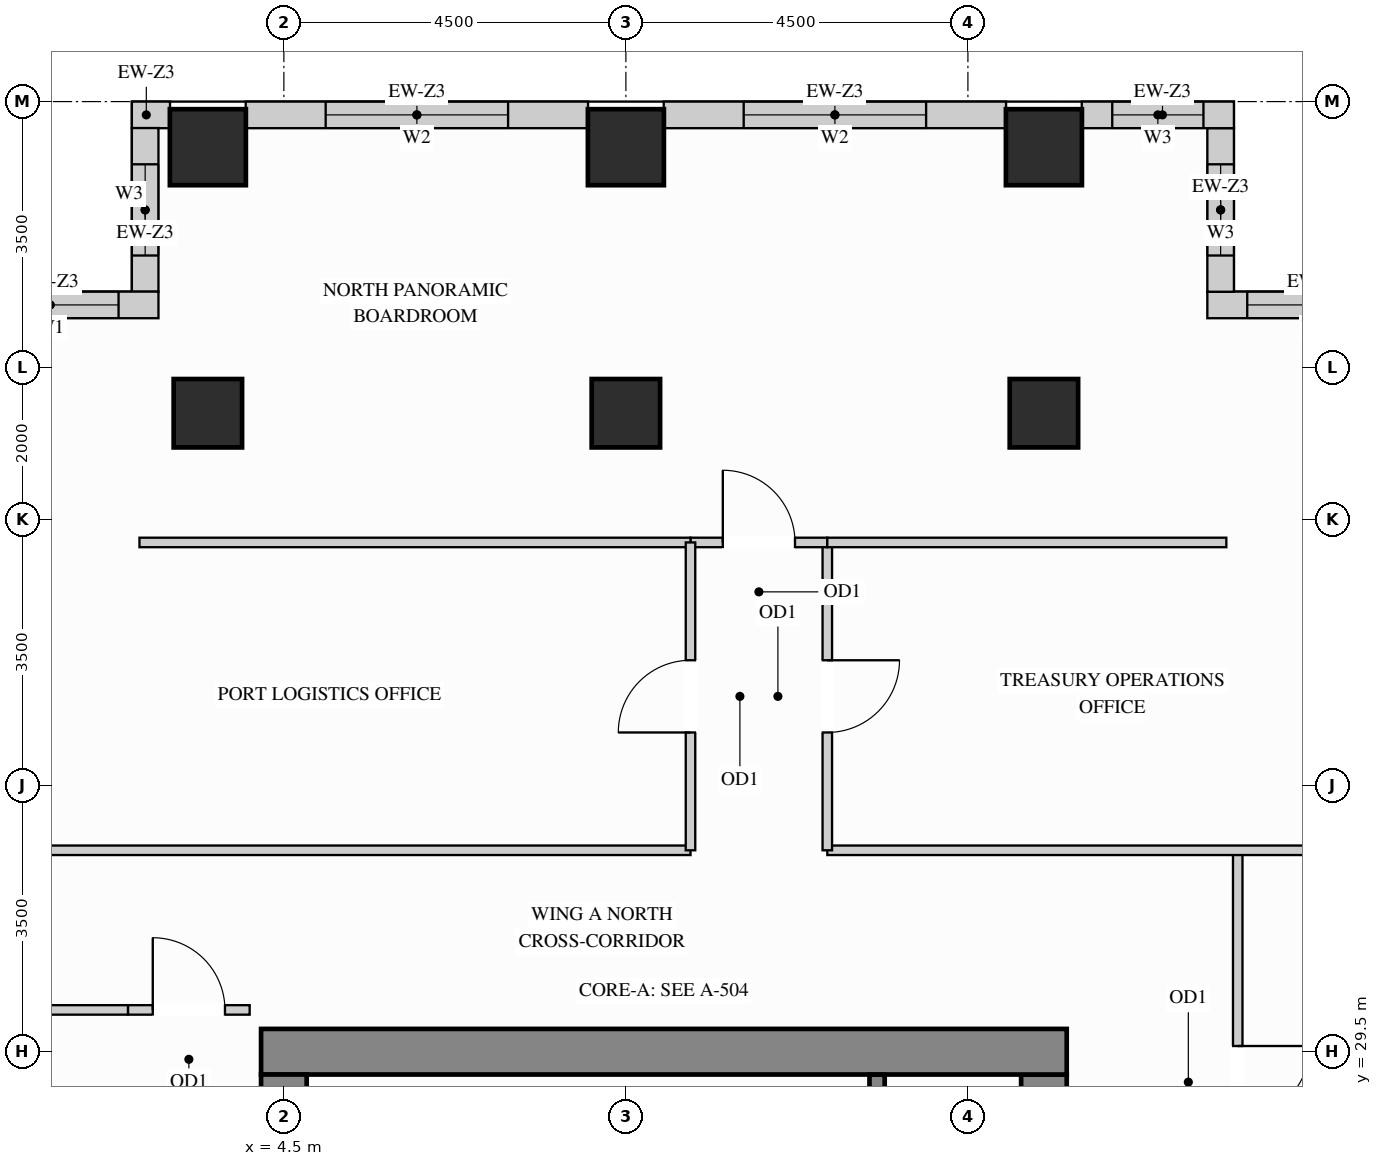
"""IFC4 building model, lengths in metres.
Left out: names, types, materials, properties, quantities, classifications, styles, units other than length and angle.
Written with IfcOpenShell. Run it as: python <this file> out.ifc"""

import sys

from ifc_helpers import new_model, si_unit, direction, frame, frame_2d, origin, origin_2d, place, context, subcontext, project, spatial, rectangle, extrude, source, transform, mapped, element, fill, save


model = new_model("IFC4")
c1 = context("Model", 3, precision=1e-05, world=origin(), true_north=direction((0.0, 1.0)))
c2 = subcontext(c1, "Body", "Model", "MODEL_VIEW")
j1 = project(units=[si_unit("LENGTHUNIT", "METRE"), si_unit("PLANEANGLEUNIT", "RADIAN")], contexts=[c1])
p1 = place(None, origin())
s1 = spatial("IfcSite", under=j1, at=p1, CompositionType="ELEMENT")
p2 = place(p1, origin())
s2 = spatial("IfcBuilding", under=s1, at=p2, CompositionType="ELEMENT")
p3 = place(p2, frame((0.0, 0.0, 164.7)))
s3 = spatial("IfcBuildingStorey", under=s2, at=p3, CompositionType="ELEMENT", Elevation=164.7)
m1 = source(origin(), c2, "Body", "SweptSolid", [
    extrude(rectangle(XDim=0.9, YDim=0.9, at=origin_2d()), origin(), (0.0, 0.0, 1.0), 3.4),
])
for number, where, z_axis, x_axis in (
    (1, (14.5, 37.9, 0.0), (0.0, 0.0, 1.0), (1.0, 0.0, 0.0)),
    (2, (3.5, 37.9, 0.0), (0.0, 0.0, 1.0), (1.0, 0.0, 0.0)),
    (3, (9.0, 37.9, 0.0), (0.0, 0.0, 1.0), (1.0, 0.0, 0.0)),
):
    element("IfcColumn", number, at=place(p3, frame(where, z_axis=z_axis, x_axis=x_axis)), inside=s3, PredefinedType="COLUMN", context=c2, shape_type="MappedRepresentation", body=[
        mapped(m1, transform((0.0, 0.0, 0.0), x_axis=(1.0, 0.0, 0.0), y_axis=(0.0, 1.0, 0.0), z_axis=(0.0, 0.0, 1.0))),
    ])
m2 = source(origin(), c2, "Body", "SweptSolid", [
    extrude(rectangle(XDim=1.0, YDim=1.0, at=origin_2d()), origin(), (0.0, 0.0, 1.0), 3.4),
])
for number, where, z_axis, x_axis in (
    (4, (14.5, 41.4, 0.0), (0.0, 0.0, 1.0), (1.0, 0.0, 0.0)),
    (5, (3.5, 41.4, 0.0), (0.0, 0.0, 1.0), (1.0, 0.0, 0.0)),
    (6, (9.0, 41.4, 0.0), (0.0, 0.0, 1.0), (1.0, 0.0, 0.0)),
):
    element("IfcColumn", number, at=place(p3, frame(where, z_axis=z_axis, x_axis=x_axis)), inside=s3, PredefinedType="COLUMN", context=c2, shape_type="MappedRepresentation", body=[
        mapped(m2, transform((0.0, 0.0, 0.0), x_axis=(1.0, 0.0, 0.0), y_axis=(0.0, 1.0, 0.0), z_axis=(0.0, 0.0, 1.0))),
    ])
m3 = source(origin(), c2, "Body", "SweptSolid", [
    extrude(rectangle(XDim=8.32, YDim=0.6, at=frame_2d((4.16, 0.0))), origin(), (0.0, 0.0, 1.0), 3.4),
])
p4 = place(p3, frame((14.5, 20.88, 0.0), z_axis=(0.0, 0.0, 1.0), x_axis=(0.0, 1.0, 0.0)))
e7 = element("IfcWall", 7, at=p4, inside=s3, PredefinedType="SHEAR", context=c2, shape_type="MappedRepresentation", body=[
    mapped(m3, transform((0.0, 0.0, 0.0), x_axis=(1.0, 0.0, 0.0), y_axis=(0.0, 1.0, 0.0), z_axis=(0.0, 0.0, 1.0))),
])
m4 = source(origin(), c2, "Body", "SweptSolid", [
    extrude(rectangle(XDim=10.6, YDim=0.6, at=frame_2d((5.3, 0.0))), origin(), (0.0, 0.0, 1.0), 3.4),
])
p5 = place(p3, frame((4.2, 29.5, 0.0), z_axis=(0.0, 0.0, 1.0), x_axis=(1.0, 0.0, 0.0)))
e8 = element("IfcWall", 8, at=p5, inside=s3, PredefinedType="SHEAR", context=c2, shape_type="MappedRepresentation", body=[
    mapped(m4, transform((0.0, 0.0, 0.0), x_axis=(1.0, 0.0, 0.0), y_axis=(0.0, 1.0, 0.0), z_axis=(0.0, 0.0, 1.0))),
])
m5 = source(origin(), c2, "Body", "SweptSolid", [
    extrude(rectangle(XDim=20.4, YDim=0.6, at=frame_2d((10.2, 0.0))), origin(), (0.0, 0.0, 1.0), 3.4),
])
p6 = place(p3, frame((4.5, 8.8, 0.0), z_axis=(0.0, 0.0, 1.0), x_axis=(0.0, 1.0, 0.0)))
e9 = element("IfcWall", 9, at=p6, inside=s3, PredefinedType="SHEAR", context=c2, shape_type="MappedRepresentation", body=[
    mapped(m5, transform((0.0, 0.0, 0.0), x_axis=(1.0, 0.0, 0.0), y_axis=(0.0, 1.0, 0.0), z_axis=(0.0, 0.0, 1.0))),
])
p7 = place(p3, frame((19.5, 39.325, 0.0), z_axis=(0.0, 0.0, 1.0), x_axis=(-1.0, 0.0, 0.0)))
e10 = element("IfcWall", 10, at=p7, inside=s3, PredefinedType="SOLIDWALL", context=c2, shape_type="SweptSolid", body=[
    extrude(rectangle(XDim=2.85, YDim=0.35, at=frame_2d((1.425, 0.0))), origin(), (0.0, 0.0, 1.0), 3.385),
])
p8 = place(p7, frame((0.525, 0.0, 0.78)))
e11 = element("IfcOpeningElement", 11, at=p8, cuts=e10, PredefinedType="OPENING", context=c2, shape_type="SweptSolid", body=[
    extrude(rectangle(XDim=1.8, YDim=2.1, at=frame_2d((0.9, 1.05))), frame((0.0, 0.185, 0.0), z_axis=(0.0, -1.0, 0.0), x_axis=(1.0, 0.0, 0.0)), (0.0, 0.0, 1.0), 0.37),
])
p9 = place(p3, frame((16.825, 39.498, 0.0), z_axis=(0.0, 0.0, 1.0), x_axis=(0.0, 1.0, 0.0)))
e12 = element("IfcWall", 12, at=p9, inside=s3, PredefinedType="SOLIDWALL", context=c2, shape_type="SweptSolid", body=[
    extrude(rectangle(XDim=2.154, YDim=0.35, at=frame_2d((1.077, 0.0))), origin(), (0.0, 0.0, 1.0), 3.385),
])
p10 = place(p9, frame((0.477, 0.0, 0.78)))
e13 = element("IfcOpeningElement", 13, at=p10, cuts=e12, PredefinedType="OPENING", context=c2, shape_type="SweptSolid", body=[
    extrude(rectangle(XDim=1.2, YDim=2.1, at=frame_2d((0.6, 1.05))), frame((0.0, 0.185, 0.0), z_axis=(0.0, -1.0, 0.0), x_axis=(1.0, 0.0, 0.0)), (0.0, 0.0, 1.0), 0.37),
])
p11 = place(p3, frame((17.0, 41.825, 0.0), z_axis=(0.0, 0.0, 1.0), x_axis=(-1.0, 0.0, 0.0)))
e14 = element("IfcWall", 14, at=p11, inside=s3, PredefinedType="SOLIDWALL", context=c2, shape_type="SweptSolid", body=[
    extrude(rectangle(XDim=2.002, YDim=0.35, at=frame_2d((1.001, 0.0))), origin(), (0.0, 0.0, 1.0), 3.385),
])
p12 = place(p11, frame((0.401, 0.0, 0.78)))
e15 = element("IfcOpeningElement", 15, at=p12, cuts=e14, PredefinedType="OPENING", context=c2, shape_type="SweptSolid", body=[
    extrude(rectangle(XDim=1.2, YDim=2.1, at=frame_2d((0.6, 1.05))), frame((0.0, 0.185, 0.0), z_axis=(0.0, -1.0, 0.0), x_axis=(1.0, 0.0, 0.0)), (0.0, 0.0, 1.0), 0.37),
])
p13 = place(p3, frame((14.002, 41.825, 0.0), z_axis=(0.0, 0.0, 1.0), x_axis=(-1.0, 0.0, 0.0)))
e16 = element("IfcWall", 16, at=p13, inside=s3, PredefinedType="SOLIDWALL", context=c2, shape_type="SweptSolid", body=[
    extrude(rectangle(XDim=4.504, YDim=0.35, at=frame_2d((2.252, 0.0))), origin(), (0.0, 0.0, 1.0), 2.612),
])
p14 = place(p13, frame((1.052, 0.0, 0.78)))
e17 = element("IfcOpeningElement", 17, at=p14, cuts=e16, PredefinedType="OPENING", context=c2, shape_type="SweptSolid", body=[
    extrude(rectangle(XDim=2.4, YDim=1.652, at=frame_2d((1.2, 0.826))), frame((0.0, 0.185, 0.0), z_axis=(0.0, -1.0, 0.0), x_axis=(1.0, 0.0, 0.0)), (0.0, 0.0, 1.0), 0.37),
])
p15 = place(p3, frame((8.502, 41.825, 0.0), z_axis=(0.0, 0.0, 1.0), x_axis=(-1.0, 0.0, 0.0)))
e18 = element("IfcWall", 18, at=p15, inside=s3, PredefinedType="SOLIDWALL", context=c2, shape_type="SweptSolid", body=[
    extrude(rectangle(XDim=4.504, YDim=0.35, at=frame_2d((2.252, 0.0))), origin(), (0.0, 0.0, 1.0), 2.612),
])
p16 = place(p15, frame((1.052, 0.0, 0.78)))
e19 = element("IfcOpeningElement", 19, at=p16, cuts=e18, PredefinedType="OPENING", context=c2, shape_type="SweptSolid", body=[
    extrude(rectangle(XDim=2.4, YDim=1.652, at=frame_2d((1.2, 0.826))), frame((0.0, 0.185, 0.0), z_axis=(0.0, -1.0, 0.0), x_axis=(1.0, 0.0, 0.0)), (0.0, 0.0, 1.0), 0.37),
])
m6 = source(origin(), c2, "Body", "SweptSolid", [
    extrude(rectangle(XDim=0.502, YDim=0.35, at=frame_2d((0.251, 0.0))), origin(), (0.0, 0.0, 1.0), 3.385),
])
p17 = place(p3, frame((3.002, 41.825, 0.0), z_axis=(0.0, 0.0, 1.0), x_axis=(-1.0, 0.0, 0.0)))
e20 = element("IfcWall", 20, at=p17, inside=s3, PredefinedType="SOLIDWALL", context=c2, shape_type="MappedRepresentation", body=[
    mapped(m6, transform((0.0, 0.0, 0.0), x_axis=(1.0, 0.0, 0.0), y_axis=(0.0, 1.0, 0.0), z_axis=(0.0, 0.0, 1.0))),
])
p18 = place(p3, frame((2.675, 41.652, 0.0), z_axis=(0.0, 0.0, 1.0), x_axis=(0.0, -1.0, 0.0)))
e21 = element("IfcWall", 21, at=p18, inside=s3, PredefinedType="SOLIDWALL", context=c2, shape_type="SweptSolid", body=[
    extrude(rectangle(XDim=2.154, YDim=0.35, at=frame_2d((1.077, 0.0))), origin(), (0.0, 0.0, 1.0), 3.385),
])
p19 = place(p18, frame((0.477, 0.0, 0.78)))
e22 = element("IfcOpeningElement", 22, at=p19, cuts=e21, PredefinedType="OPENING", context=c2, shape_type="SweptSolid", body=[
    extrude(rectangle(XDim=1.2, YDim=2.1, at=frame_2d((0.6, 1.05))), frame((0.0, 0.185, 0.0), z_axis=(0.0, -1.0, 0.0), x_axis=(1.0, 0.0, 0.0)), (0.0, 0.0, 1.0), 0.37),
])
p20 = place(p3, frame((2.85, 39.325, 0.0), z_axis=(0.0, 0.0, 1.0), x_axis=(-1.0, 0.0, 0.0)))
e23 = element("IfcWall", 23, at=p20, inside=s3, PredefinedType="SOLIDWALL", context=c2, shape_type="SweptSolid", body=[
    extrude(rectangle(XDim=2.85, YDim=0.35, at=frame_2d((1.425, 0.0))), origin(), (0.0, 0.0, 1.0), 3.385),
])
p21 = place(p20, frame((0.525, 0.0, 0.78)))
e24 = element("IfcOpeningElement", 24, at=p21, cuts=e23, PredefinedType="OPENING", context=c2, shape_type="SweptSolid", body=[
    extrude(rectangle(XDim=1.8, YDim=2.1, at=frame_2d((0.9, 1.05))), frame((0.0, 0.185, 0.0), z_axis=(0.0, -1.0, 0.0), x_axis=(1.0, 0.0, 0.0)), (0.0, 0.0, 1.0), 0.37),
])
p22 = place(p3, frame((17.05, 26.05, 0.0), z_axis=(0.0, 0.0, 1.0), x_axis=(0.0, 1.0, 0.0)))
e25 = element("IfcWall", 25, at=p22, inside=s3, PredefinedType="PARTITIONING", context=c2, shape_type="SweptSolid", body=[
    extrude(rectangle(XDim=6.1, YDim=0.125, at=frame_2d((3.05, 0.0))), origin(), (0.0, 0.0, 1.0), 3.385),
])
p23 = place(p22, frame((2.575, 0.0, 0.0)))
e26 = element("IfcOpeningElement", 26, at=p23, cuts=e25, PredefinedType="OPENING", context=c2, shape_type="SweptSolid", body=[
    extrude(rectangle(XDim=0.95, YDim=2.15, at=frame_2d((0.475, 1.075))), frame((0.0, 0.073, 0.0), z_axis=(0.0, -1.0, 0.0), x_axis=(1.0, 0.0, 0.0)), (0.0, 0.0, 1.0), 0.145),
])
m7 = source(origin(), c2, "Body", "SweptSolid", [
    extrude(rectangle(XDim=7.498, YDim=0.125, at=frame_2d((3.749, 0.0))), origin(), (0.0, 0.0, 1.0), 3.385),
])
p24 = place(p3, frame((11.65, 32.15, 0.0), z_axis=(0.0, 0.0, 1.0), x_axis=(1.0, 0.0, 0.0)))
e27 = element("IfcWall", 27, at=p24, inside=s3, PredefinedType="PARTITIONING", context=c2, shape_type="MappedRepresentation", body=[
    mapped(m7, transform((0.0, 0.0, 0.0), x_axis=(1.0, 0.0, 0.0), y_axis=(0.0, 1.0, 0.0), z_axis=(0.0, 0.0, 1.0))),
])
m8 = source(origin(), c2, "Body", "SweptSolid", [
    extrude(rectangle(XDim=9.498, YDim=0.125, at=frame_2d((4.749, 0.0))), origin(), (0.0, 0.0, 1.0), 3.385),
])
p25 = place(p3, frame((0.352, 32.15, 0.0), z_axis=(0.0, 0.0, 1.0), x_axis=(1.0, 0.0, 0.0)))
e28 = element("IfcWall", 28, at=p25, inside=s3, PredefinedType="PARTITIONING", context=c2, shape_type="MappedRepresentation", body=[
    mapped(m8, transform((0.0, 0.0, 0.0), x_axis=(1.0, 0.0, 0.0), y_axis=(0.0, 1.0, 0.0), z_axis=(0.0, 0.0, 1.0))),
])
m9 = source(origin(), c2, "Body", "SweptSolid", [
    extrude(rectangle(XDim=1.33, YDim=0.125, at=frame_2d((0.665, 0.0))), origin(), (0.0, 0.0, 1.0), 3.385),
])
p26 = place(p3, frame((1.12, 30.05, 0.0), z_axis=(0.0, 0.0, 1.0), x_axis=(1.0, 0.0, 0.0)))
e29 = element("IfcWall", 29, at=p26, inside=s3, PredefinedType="PARTITIONING", context=c2, shape_type="MappedRepresentation", body=[
    mapped(m9, transform((0.0, 0.0, 0.0), x_axis=(1.0, 0.0, 0.0), y_axis=(0.0, 1.0, 0.0), z_axis=(0.0, 0.0, 1.0))),
])
p27 = place(p3, frame((2.45, 30.05, 0.0), z_axis=(0.0, 0.0, 1.0), x_axis=(1.0, 0.0, 0.0)))
e30 = element("IfcWall", 30, at=p27, inside=s3, PredefinedType="PARTITIONING", context=c2, shape_type="SweptSolid", body=[
    extrude(rectangle(XDim=1.6, YDim=0.125, at=frame_2d((0.8, 0.0))), origin(), (0.0, 0.0, 1.0), 3.385),
])
p28 = place(p27, frame((0.325, 0.0, 0.0)))
e31 = element("IfcOpeningElement", 31, at=p28, cuts=e30, PredefinedType="OPENING", context=c2, shape_type="SweptSolid", body=[
    extrude(rectangle(XDim=0.95, YDim=2.15, at=frame_2d((0.475, 1.075))), frame((0.0, 0.073, 0.0), z_axis=(0.0, -1.0, 0.0), x_axis=(1.0, 0.0, 0.0)), (0.0, 0.0, 1.0), 0.145),
])
p29 = place(p3, frame((11.65, 32.15, 0.0), z_axis=(0.0, 0.0, 1.0), x_axis=(0.0, 1.0, 0.0)))
e32 = element("IfcWall", 32, at=p29, inside=s3, PredefinedType="PARTITIONING", context=c2, shape_type="SweptSolid", body=[
    extrude(rectangle(XDim=4.05, YDim=0.125, at=frame_2d((2.025, 0.0))), origin(), (0.0, 0.0, 1.0), 3.385),
])
p30 = place(p29, frame((1.55, 0.0, 0.0)))
e33 = element("IfcOpeningElement", 33, at=p30, cuts=e32, PredefinedType="OPENING", context=c2, shape_type="SweptSolid", body=[
    extrude(rectangle(XDim=0.95, YDim=2.15, at=frame_2d((0.475, 1.075))), frame((0.0, 0.073, 0.0), z_axis=(0.0, -1.0, 0.0), x_axis=(1.0, 0.0, 0.0)), (0.0, 0.0, 1.0), 0.145),
])
p31 = place(p3, frame((9.85, 36.2, 0.0), z_axis=(0.0, 0.0, 1.0), x_axis=(1.0, 0.0, 0.0)))
e34 = element("IfcWall", 34, at=p31, inside=s3, PredefinedType="PARTITIONING", context=c2, shape_type="SweptSolid", body=[
    extrude(rectangle(XDim=1.8, YDim=0.125, at=frame_2d((0.9, 0.0))), origin(), (0.0, 0.0, 1.0), 2.848),
])
p32 = place(p31, frame((0.425, 0.0, 0.0)))
e35 = element("IfcOpeningElement", 35, at=p32, cuts=e34, PredefinedType="OPENING", context=c2, shape_type="SweptSolid", body=[
    extrude(rectangle(XDim=0.95, YDim=2.15, at=frame_2d((0.475, 1.075))), frame((0.0, 0.073, 0.0), z_axis=(0.0, -1.0, 0.0), x_axis=(1.0, 0.0, 0.0)), (0.0, 0.0, 1.0), 0.145),
])
m10 = source(origin(), c2, "Body", "SweptSolid", [
    extrude(rectangle(XDim=5.25, YDim=0.125, at=frame_2d((2.625, 0.0))), origin(), (0.0, 0.0, 1.0), 2.848),
])
p33 = place(p3, frame((11.65, 36.2, 0.0), z_axis=(0.0, 0.0, 1.0), x_axis=(1.0, 0.0, 0.0)))
e36 = element("IfcWall", 36, at=p33, inside=s3, PredefinedType="PARTITIONING", context=c2, shape_type="MappedRepresentation", body=[
    mapped(m10, transform((0.0, 0.0, 0.0), x_axis=(1.0, 0.0, 0.0), y_axis=(0.0, 1.0, 0.0), z_axis=(0.0, 0.0, 1.0))),
])
m11 = source(origin(), c2, "Body", "SweptSolid", [
    extrude(rectangle(XDim=7.25, YDim=0.125, at=frame_2d((3.625, 0.0))), origin(), (0.0, 0.0, 1.0), 2.848),
])
p34 = place(p3, frame((2.6, 36.2, 0.0), z_axis=(0.0, 0.0, 1.0), x_axis=(1.0, 0.0, 0.0)))
e37 = element("IfcWall", 37, at=p34, inside=s3, PredefinedType="PARTITIONING", context=c2, shape_type="MappedRepresentation", body=[
    mapped(m11, transform((0.0, 0.0, 0.0), x_axis=(1.0, 0.0, 0.0), y_axis=(0.0, 1.0, 0.0), z_axis=(0.0, 0.0, 1.0))),
])
p35 = place(p3, frame((9.85, 32.15, 0.0), z_axis=(0.0, 0.0, 1.0), x_axis=(0.0, 1.0, 0.0)))
e38 = element("IfcWall", 38, at=p35, inside=s3, PredefinedType="PARTITIONING", context=c2, shape_type="SweptSolid", body=[
    extrude(rectangle(XDim=4.05, YDim=0.125, at=frame_2d((2.025, 0.0))), origin(), (0.0, 0.0, 1.0), 3.385),
])
p36 = place(p35, frame((1.55, 0.0, 0.0)))
e39 = element("IfcOpeningElement", 39, at=p36, cuts=e38, PredefinedType="OPENING", context=c2, shape_type="SweptSolid", body=[
    extrude(rectangle(XDim=0.95, YDim=2.15, at=frame_2d((0.475, 1.075))), frame((0.0, 0.073, 0.0), z_axis=(0.0, -1.0, 0.0), x_axis=(1.0, 0.0, 0.0)), (0.0, 0.0, 1.0), 0.145),
])
m12 = source(origin(), c2, "Body", "SweptSolid", [
    extrude(rectangle(XDim=3.753, YDim=0.2, at=frame_2d((1.876, 0.0))), origin(), (0.0, 0.0, 1.0), 3.4),
])
p37 = place(p3, frame((12.305, 25.445, 0.0), z_axis=(0.0, 0.0, 1.0), x_axis=(0.0, 1.0, 0.0)))
e40 = element("IfcWall", 40, at=p37, inside=s3, PredefinedType="SHEAR", context=c2, shape_type="MappedRepresentation", body=[
    mapped(m12, transform((0.0, 0.0, 0.0), x_axis=(1.0, 0.0, 0.0), y_axis=(0.0, 1.0, 0.0), z_axis=(0.0, 0.0, 1.0))),
])
m13 = source(origin(), c2, "Body", "SweptSolid", [
    extrude(rectangle(XDim=0.95, YDim=2.15, at=frame_2d((0.475, 1.075))), frame((0.0, 0.025, 0.0), z_axis=(0.0, -1.0, 0.0), x_axis=(1.0, 0.0, 0.0)), (0.0, 0.0, 1.0), 0.05),
])
p38 = place(p23, origin())
e41 = element("IfcDoor", 41, at=p38, inside=s3, OperationType="SINGLE_SWING_RIGHT", PredefinedType="DOOR", context=c2, shape_type="MappedRepresentation", body=[
    mapped(m13, transform((0.0, 0.0, 0.0), x_axis=(1.0, 0.0, 0.0), y_axis=(0.0, 1.0, 0.0), z_axis=(0.0, 0.0, 1.0))),
])
fill(e26, e41)
p39 = place(p30, origin())
e42 = element("IfcDoor", 42, at=p39, inside=s3, OperationType="SINGLE_SWING_RIGHT", PredefinedType="DOOR", context=c2, shape_type="MappedRepresentation", body=[
    mapped(m13, transform((0.0, 0.0, 0.0), x_axis=(1.0, 0.0, 0.0), y_axis=(0.0, 1.0, 0.0), z_axis=(0.0, 0.0, 1.0))),
])
fill(e33, e42)
p40 = place(p32, origin())
e43 = element("IfcDoor", 43, at=p40, inside=s3, OperationType="SINGLE_SWING_LEFT", PredefinedType="DOOR", context=c2, shape_type="MappedRepresentation", body=[
    mapped(m13, transform((0.0, 0.0, 0.0), x_axis=(1.0, 0.0, 0.0), y_axis=(0.0, 1.0, 0.0), z_axis=(0.0, 0.0, 1.0))),
])
fill(e35, e43)
p41 = place(p36, origin())
e44 = element("IfcDoor", 44, at=p41, inside=s3, OperationType="SINGLE_SWING_LEFT", PredefinedType="DOOR", context=c2, shape_type="MappedRepresentation", body=[
    mapped(m13, transform((0.0, 0.0, 0.0), x_axis=(1.0, 0.0, 0.0), y_axis=(0.0, 1.0, 0.0), z_axis=(0.0, 0.0, 1.0))),
])
fill(e39, e44)
p42 = place(p28, origin())
e45 = element("IfcDoor", 45, at=p42, inside=s3, OperationType="SINGLE_SWING_LEFT", PredefinedType="DOOR", context=c2, shape_type="MappedRepresentation", body=[
    mapped(m13, transform((0.0, 0.0, 0.0), x_axis=(1.0, 0.0, 0.0), y_axis=(0.0, 1.0, 0.0), z_axis=(0.0, 0.0, 1.0))),
])
fill(e31, e45)
m14 = source(origin(), c2, "Body", "SweptSolid", [
    extrude(rectangle(XDim=1.8, YDim=2.1, at=frame_2d((0.9, 1.05))), frame((0.0, 0.03, 0.0), z_axis=(0.0, -1.0, 0.0), x_axis=(1.0, 0.0, 0.0)), (0.0, 0.0, 1.0), 0.06),
])
p43 = place(p8, origin())
e46 = element("IfcWindow", 46, at=p43, inside=s3, PartitioningType="SINGLE_PANEL", PredefinedType="WINDOW", context=c2, shape_type="MappedRepresentation", body=[
    mapped(m14, transform((0.0, 0.0, 0.0), x_axis=(1.0, 0.0, 0.0), y_axis=(0.0, 1.0, 0.0), z_axis=(0.0, 0.0, 1.0))),
])
fill(e11, e46)
p44 = place(p21, origin())
e47 = element("IfcWindow", 47, at=p44, inside=s3, PartitioningType="SINGLE_PANEL", PredefinedType="WINDOW", context=c2, shape_type="MappedRepresentation", body=[
    mapped(m14, transform((0.0, 0.0, 0.0), x_axis=(1.0, 0.0, 0.0), y_axis=(0.0, 1.0, 0.0), z_axis=(0.0, 0.0, 1.0))),
])
fill(e24, e47)
m15 = source(origin(), c2, "Body", "SweptSolid", [
    extrude(rectangle(XDim=2.4, YDim=1.652, at=frame_2d((1.2, 0.826))), frame((0.0, 0.03, 0.0), z_axis=(0.0, -1.0, 0.0), x_axis=(1.0, 0.0, 0.0)), (0.0, 0.0, 1.0), 0.06),
])
p45 = place(p14, origin())
e48 = element("IfcWindow", 48, at=p45, inside=s3, PartitioningType="SINGLE_PANEL", PredefinedType="WINDOW", context=c2, shape_type="MappedRepresentation", body=[
    mapped(m15, transform((0.0, 0.0, 0.0), x_axis=(1.0, 0.0, 0.0), y_axis=(0.0, 1.0, 0.0), z_axis=(0.0, 0.0, 1.0))),
])
fill(e17, e48)
p46 = place(p16, origin())
e49 = element("IfcWindow", 49, at=p46, inside=s3, PartitioningType="SINGLE_PANEL", PredefinedType="WINDOW", context=c2, shape_type="MappedRepresentation", body=[
    mapped(m15, transform((0.0, 0.0, 0.0), x_axis=(1.0, 0.0, 0.0), y_axis=(0.0, 1.0, 0.0), z_axis=(0.0, 0.0, 1.0))),
])
fill(e19, e49)
m16 = source(origin(), c2, "Body", "SweptSolid", [
    extrude(rectangle(XDim=1.2, YDim=2.1, at=frame_2d((0.6, 1.05))), frame((0.0, 0.03, 0.0), z_axis=(0.0, -1.0, 0.0), x_axis=(1.0, 0.0, 0.0)), (0.0, 0.0, 1.0), 0.06),
])
p47 = place(p10, origin())
e50 = element("IfcWindow", 50, at=p47, inside=s3, PartitioningType="SINGLE_PANEL", PredefinedType="WINDOW", context=c2, shape_type="MappedRepresentation", body=[
    mapped(m16, transform((0.0, 0.0, 0.0), x_axis=(1.0, 0.0, 0.0), y_axis=(0.0, 1.0, 0.0), z_axis=(0.0, 0.0, 1.0))),
])
fill(e13, e50)
p48 = place(p12, origin())
e51 = element("IfcWindow", 51, at=p48, inside=s3, PartitioningType="SINGLE_PANEL", PredefinedType="WINDOW", context=c2, shape_type="MappedRepresentation", body=[
    mapped(m16, transform((0.0, 0.0, 0.0), x_axis=(1.0, 0.0, 0.0), y_axis=(0.0, 1.0, 0.0), z_axis=(0.0, 0.0, 1.0))),
])
fill(e15, e51)
p49 = place(p19, origin())
e52 = element("IfcWindow", 52, at=p49, inside=s3, PartitioningType="SINGLE_PANEL", PredefinedType="WINDOW", context=c2, shape_type="MappedRepresentation", body=[
    mapped(m16, transform((0.0, 0.0, 0.0), x_axis=(1.0, 0.0, 0.0), y_axis=(0.0, 1.0, 0.0), z_axis=(0.0, 0.0, 1.0))),
])
fill(e22, e52)
save(model, sys.argv[1])
